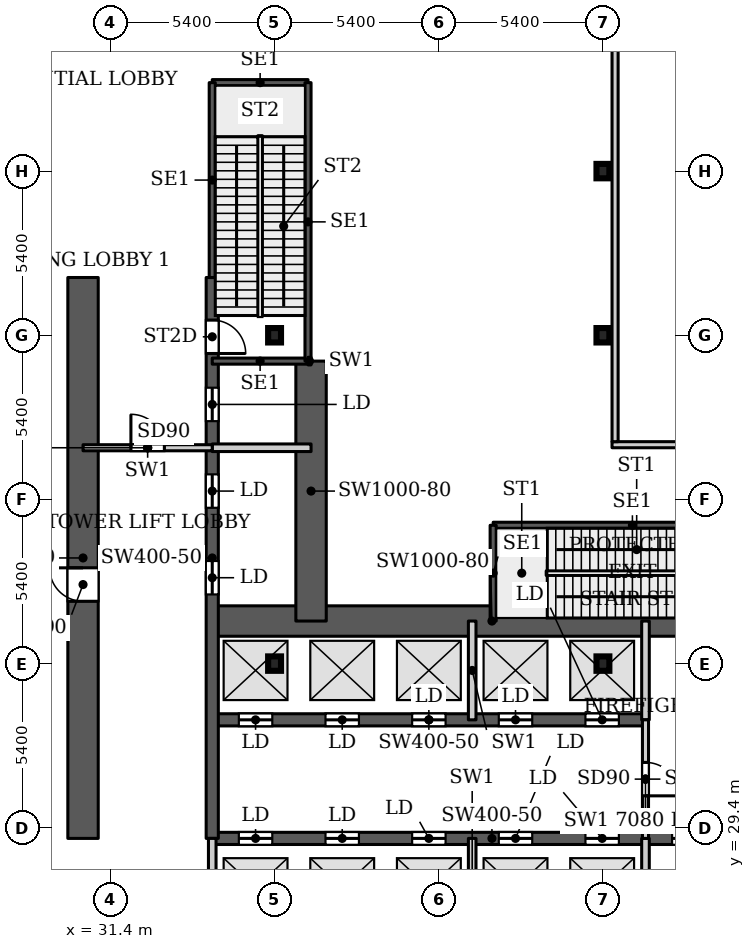
"""IFC4 building model, lengths in metres.
Left out: names, types, materials, properties, quantities, classifications, styles, units other than length and angle.
Written with IfcOpenShell. Run it as: python <this file> out.ifc"""

import sys

from ifc_helpers import new_model, si_unit, direction, frame, frame_2d, origin, origin_2d, place, context, subcontext, project, spatial, rectangle, i_section, extrude, source, transform, mapped, element, fill, save


model = new_model("IFC4")
c1 = context("Model", 3, precision=1e-05, world=origin(), true_north=direction((0.0, 1.0)))
c2 = subcontext(c1, "Body", "Model", "MODEL_VIEW")
j1 = project(units=[si_unit("LENGTHUNIT", "METRE"), si_unit("PLANEANGLEUNIT", "RADIAN")], contexts=[c1])
p1 = place(None, origin())
s1 = spatial("IfcSite", under=j1, at=p1, CompositionType="ELEMENT")
p2 = place(p1, origin())
s2 = spatial("IfcBuilding", under=s1, at=p2, CompositionType="ELEMENT")
p3 = place(p2, origin())
s3 = spatial("IfcBuildingStorey", under=s2, at=p3, CompositionType="ELEMENT", Elevation=0.0)
for number, where, z_axis, x_axis in (
    (1, (36.8, 34.8, 0.0), (0.0, 0.0, 1.0), (1.0, 0.0, 0.0)),
    (2, (47.6, 34.8, 0.0), (0.0, 0.0, 1.0), (1.0, 0.0, 0.0)),
    (3, (36.8, 45.6, 0.0), (0.0, 0.0, 1.0), (1.0, 0.0, 0.0)),
    (4, (47.6, 45.6, 0.0), (0.0, 0.0, 1.0), (1.0, 0.0, 0.0)),
    (5, (47.6, 51.0, 0.0), (0.0, 0.0, 1.0), (1.0, 0.0, 0.0)),
):
    element("IfcColumn", number, at=place(p3, frame(where, z_axis=z_axis, x_axis=x_axis)), inside=s3, PredefinedType="COLUMN", context=c2, shape_type="SweptSolid", body=[
        extrude(i_section(OverallWidth=0.424, OverallDepth=0.474, WebThickness=0.048, FlangeThickness=0.077, FilletRadius=0.014, at=origin_2d()), origin(), (0.0, 0.0, 1.0), 7.5),
    ])
p4 = place(p3, frame((34.75, 29.05, 0.0), z_axis=(0.0, 0.0, 1.0), x_axis=(1.0, 0.0, 0.0)))
e6 = element("IfcWall", 6, at=p4, inside=s3, PredefinedType="SHEAR", context=c2, shape_type="SweptSolid", body=[
    extrude(rectangle(XDim=18.4, YDim=0.4, at=frame_2d((9.2, 0.0))), origin(), (0.0, 0.0, 1.0), 7.5),
])
p5 = place(p4, frame((0.875, 0.0, 0.0)))
e7 = element("IfcOpeningElement", 7, at=p5, cuts=e6, PredefinedType="OPENING", context=c2, shape_type="SweptSolid", body=[
    extrude(rectangle(XDim=1.1, YDim=2.2, at=frame_2d((0.55, 1.1))), frame((0.0, 0.21, 0.0), z_axis=(0.0, -1.0, 0.0), x_axis=(1.0, 0.0, 0.0)), (0.0, 0.0, 1.0), 0.42),
])
p6 = place(p4, frame((3.725, 0.0, 0.0)))
e8 = element("IfcOpeningElement", 8, at=p6, cuts=e6, PredefinedType="OPENING", context=c2, shape_type="SweptSolid", body=[
    extrude(rectangle(XDim=1.1, YDim=2.2, at=frame_2d((0.55, 1.1))), frame((0.0, 0.21, 0.0), z_axis=(0.0, -1.0, 0.0), x_axis=(1.0, 0.0, 0.0)), (0.0, 0.0, 1.0), 0.42),
])
p7 = place(p4, frame((6.575, 0.0, 0.0)))
e9 = element("IfcOpeningElement", 9, at=p7, cuts=e6, PredefinedType="OPENING", context=c2, shape_type="SweptSolid", body=[
    extrude(rectangle(XDim=1.1, YDim=2.2, at=frame_2d((0.55, 1.1))), frame((0.0, 0.21, 0.0), z_axis=(0.0, -1.0, 0.0), x_axis=(1.0, 0.0, 0.0)), (0.0, 0.0, 1.0), 0.42),
])
p8 = place(p4, frame((9.425, 0.0, 0.0)))
e10 = element("IfcOpeningElement", 10, at=p8, cuts=e6, PredefinedType="OPENING", context=c2, shape_type="SweptSolid", body=[
    extrude(rectangle(XDim=1.1, YDim=2.2, at=frame_2d((0.55, 1.1))), frame((0.0, 0.21, 0.0), z_axis=(0.0, -1.0, 0.0), x_axis=(1.0, 0.0, 0.0)), (0.0, 0.0, 1.0), 0.42),
])
p9 = place(p4, frame((12.275, 0.0, 0.0)))
e11 = element("IfcOpeningElement", 11, at=p9, cuts=e6, PredefinedType="OPENING", context=c2, shape_type="SweptSolid", body=[
    extrude(rectangle(XDim=1.1, YDim=2.2, at=frame_2d((0.55, 1.1))), frame((0.0, 0.21, 0.0), z_axis=(0.0, -1.0, 0.0), x_axis=(1.0, 0.0, 0.0)), (0.0, 0.0, 1.0), 0.42),
])
p10 = place(p4, frame((15.125, 0.0, 0.0)))
e12 = element("IfcOpeningElement", 12, at=p10, cuts=e6, PredefinedType="OPENING", context=c2, shape_type="SweptSolid", body=[
    extrude(rectangle(XDim=1.1, YDim=2.2, at=frame_2d((0.55, 1.1))), frame((0.0, 0.21, 0.0), z_axis=(0.0, -1.0, 0.0), x_axis=(1.0, 0.0, 0.0)), (0.0, 0.0, 1.0), 0.42),
])
p11 = place(p3, frame((34.75, 32.95, 0.0), z_axis=(0.0, 0.0, 1.0), x_axis=(1.0, 0.0, 0.0)))
e13 = element("IfcWall", 13, at=p11, inside=s3, PredefinedType="SHEAR", context=c2, shape_type="SweptSolid", body=[
    extrude(rectangle(XDim=14.25, YDim=0.4, at=frame_2d((7.125, 0.0))), origin(), (0.0, 0.0, 1.0), 7.5),
])
p12 = place(p11, frame((0.875, 0.0, 0.0)))
e14 = element("IfcOpeningElement", 14, at=p12, cuts=e13, PredefinedType="OPENING", context=c2, shape_type="SweptSolid", body=[
    extrude(rectangle(XDim=1.1, YDim=2.2, at=frame_2d((0.55, 1.1))), frame((0.0, 0.21, 0.0), z_axis=(0.0, -1.0, 0.0), x_axis=(1.0, 0.0, 0.0)), (0.0, 0.0, 1.0), 0.42),
])
p13 = place(p11, frame((3.725, 0.0, 0.0)))
e15 = element("IfcOpeningElement", 15, at=p13, cuts=e13, PredefinedType="OPENING", context=c2, shape_type="SweptSolid", body=[
    extrude(rectangle(XDim=1.1, YDim=2.2, at=frame_2d((0.55, 1.1))), frame((0.0, 0.21, 0.0), z_axis=(0.0, -1.0, 0.0), x_axis=(1.0, 0.0, 0.0)), (0.0, 0.0, 1.0), 0.42),
])
p14 = place(p11, frame((6.575, 0.0, 0.0)))
e16 = element("IfcOpeningElement", 16, at=p14, cuts=e13, PredefinedType="OPENING", context=c2, shape_type="SweptSolid", body=[
    extrude(rectangle(XDim=1.1, YDim=2.2, at=frame_2d((0.55, 1.1))), frame((0.0, 0.21, 0.0), z_axis=(0.0, -1.0, 0.0), x_axis=(1.0, 0.0, 0.0)), (0.0, 0.0, 1.0), 0.42),
])
p15 = place(p11, frame((9.425, 0.0, 0.0)))
e17 = element("IfcOpeningElement", 17, at=p15, cuts=e13, PredefinedType="OPENING", context=c2, shape_type="SweptSolid", body=[
    extrude(rectangle(XDim=1.1, YDim=2.2, at=frame_2d((0.55, 1.1))), frame((0.0, 0.21, 0.0), z_axis=(0.0, -1.0, 0.0), x_axis=(1.0, 0.0, 0.0)), (0.0, 0.0, 1.0), 0.42),
])
p16 = place(p11, frame((12.275, 0.0, 0.0)))
e18 = element("IfcOpeningElement", 18, at=p16, cuts=e13, PredefinedType="OPENING", context=c2, shape_type="SweptSolid", body=[
    extrude(rectangle(XDim=1.1, YDim=2.2, at=frame_2d((0.55, 1.1))), frame((0.0, 0.21, 0.0), z_axis=(0.0, -1.0, 0.0), x_axis=(1.0, 0.0, 0.0)), (0.0, 0.0, 1.0), 0.42),
])
p17 = place(p3, frame((34.75, 36.2, 0.0), z_axis=(0.0, 0.0, 1.0), x_axis=(1.0, 0.0, 0.0)))
e19 = element("IfcWall", 19, at=p17, inside=s3, PredefinedType="SHEAR", context=c2, shape_type="SweptSolid", body=[
    extrude(rectangle(XDim=18.4, YDim=1.0, at=frame_2d((9.2, 0.0))), origin(), (0.0, 0.0, 1.0), 7.5),
])
p18 = place(p17, frame((16.9, 0.0, 0.0)))
e20 = element("IfcOpeningElement", 20, at=p18, cuts=e19, PredefinedType="OPENING", context=c2, shape_type="SweptSolid", body=[
    extrude(rectangle(XDim=1.0, YDim=2.2, at=frame_2d((0.5, 1.1))), frame((0.0, 0.51, 0.0), z_axis=(0.0, -1.0, 0.0), x_axis=(1.0, 0.0, 0.0)), (0.0, 0.0, 1.0), 1.02),
])
p19 = place(p3, frame((34.75, 29.05, 0.0), z_axis=(0.0, 0.0, 1.0), x_axis=(0.0, 1.0, 0.0)))
e21 = element("IfcWall", 21, at=p19, inside=s3, PredefinedType="SHEAR", context=c2, shape_type="SweptSolid", body=[
    extrude(rectangle(XDim=18.45, YDim=0.4, at=frame_2d((9.225, 0.0))), origin(), (0.0, 0.0, 1.0), 7.5),
])
p20 = place(p19, frame((8.025, 0.0, 0.0)))
e22 = element("IfcOpeningElement", 22, at=p20, cuts=e21, PredefinedType="OPENING", context=c2, shape_type="SweptSolid", body=[
    extrude(rectangle(XDim=1.1, YDim=2.2, at=frame_2d((0.55, 1.1))), frame((0.0, 0.21, 0.0), z_axis=(0.0, -1.0, 0.0), x_axis=(1.0, 0.0, 0.0)), (0.0, 0.0, 1.0), 0.42),
])
p21 = place(p19, frame((10.875, 0.0, 0.0)))
e23 = element("IfcOpeningElement", 23, at=p21, cuts=e21, PredefinedType="OPENING", context=c2, shape_type="SweptSolid", body=[
    extrude(rectangle(XDim=1.1, YDim=2.2, at=frame_2d((0.55, 1.1))), frame((0.0, 0.21, 0.0), z_axis=(0.0, -1.0, 0.0), x_axis=(1.0, 0.0, 0.0)), (0.0, 0.0, 1.0), 0.42),
])
p22 = place(p19, frame((13.725, 0.0, 0.0)))
e24 = element("IfcOpeningElement", 24, at=p22, cuts=e21, PredefinedType="OPENING", context=c2, shape_type="SweptSolid", body=[
    extrude(rectangle(XDim=1.1, YDim=2.2, at=frame_2d((0.55, 1.1))), frame((0.0, 0.21, 0.0), z_axis=(0.0, -1.0, 0.0), x_axis=(1.0, 0.0, 0.0)), (0.0, 0.0, 1.0), 0.42),
])
p23 = place(p19, frame((15.95, 0.0, 0.0)))
e25 = element("IfcOpeningElement", 25, at=p23, cuts=e21, PredefinedType="OPENING", context=c2, shape_type="SweptSolid", body=[
    extrude(rectangle(XDim=1.1, YDim=2.2, at=frame_2d((0.55, 1.1))), frame((0.0, 0.21, 0.0), z_axis=(0.0, -1.0, 0.0), x_axis=(1.0, 0.0, 0.0)), (0.0, 0.0, 1.0), 0.42),
])
p24 = place(p3, frame((38.0, 36.2, 0.0), z_axis=(0.0, 0.0, 1.0), x_axis=(0.0, 1.0, 0.0)))
e26 = element("IfcWall", 26, at=p24, inside=s3, PredefinedType="SHEAR", context=c2, shape_type="SweptSolid", body=[
    extrude(rectangle(XDim=8.55, YDim=1.0, at=frame_2d((4.275, 0.0))), origin(), (0.0, 0.0, 1.0), 7.5),
])
p25 = place(p3, frame((30.5, 29.05, 0.0), z_axis=(0.0, 0.0, 1.0), x_axis=(0.0, 1.0, 0.0)))
e27 = element("IfcWall", 27, at=p25, inside=s3, PredefinedType="SHEAR", context=c2, shape_type="SweptSolid", body=[
    extrude(rectangle(XDim=18.45, YDim=1.0, at=frame_2d((9.225, 0.0))), origin(), (0.0, 0.0, 1.0), 7.5),
])
p26 = place(p25, frame((7.8, 0.0, 0.0)))
e28 = element("IfcOpeningElement", 28, at=p26, cuts=e27, PredefinedType="OPENING", context=c2, shape_type="SweptSolid", body=[
    extrude(rectangle(XDim=1.1, YDim=2.2, at=frame_2d((0.55, 1.1))), frame((0.0, 0.51, 0.0), z_axis=(0.0, -1.0, 0.0), x_axis=(1.0, 0.0, 0.0)), (0.0, 0.0, 1.0), 1.02),
])
p27 = place(p3, frame((43.99, 39.35, 0.0), z_axis=(0.0, 0.0, 1.0), x_axis=(1.0, 0.0, 0.0)))
e29 = element("IfcWall", 29, at=p27, inside=s3, PredefinedType="SHEAR", context=c2, shape_type="SweptSolid", body=[
    extrude(rectangle(XDim=9.16, YDim=0.2, at=frame_2d((4.58, 0.0))), origin(), (0.0, 0.0, 1.0), 7.5),
])
p28 = place(p3, frame((43.99, 36.2, 0.0), z_axis=(0.0, 0.0, 1.0), x_axis=(0.0, 1.0, 0.0)))
e30 = element("IfcWall", 30, at=p28, inside=s3, PredefinedType="SHEAR", context=c2, shape_type="SweptSolid", body=[
    extrude(rectangle(XDim=3.15, YDim=0.2, at=frame_2d((1.575, 0.0))), origin(), (0.0, 0.0, 1.0), 7.5),
])
for number, where, z_axis, x_axis in (
    (31, (34.75, 44.75, 0.0), (0.0, 0.0, 1.0), (1.0, 0.0, 0.0)),
    (32, (34.75, 53.91, 0.0), (0.0, 0.0, 1.0), (1.0, 0.0, 0.0)),
):
    element("IfcWall", number, at=place(p3, frame(where, z_axis=z_axis, x_axis=x_axis)), inside=s3, PredefinedType="SHEAR", context=c2, shape_type="SweptSolid", body=[
        extrude(rectangle(XDim=3.15, YDim=0.2, at=frame_2d((1.575, 0.0))), origin(), (0.0, 0.0, 1.0), 7.5),
    ])
p29 = place(p3, frame((34.75, 47.5, 0.0), z_axis=(0.0, 0.0, 1.0), x_axis=(0.0, 1.0, 0.0)))
e33 = element("IfcWall", 33, at=p29, inside=s3, PredefinedType="SHEAR", context=c2, shape_type="SweptSolid", body=[
    extrude(rectangle(XDim=6.41, YDim=0.2, at=frame_2d((3.205, 0.0))), origin(), (0.0, 0.0, 1.0), 7.5),
])
p30 = place(p3, frame((37.9, 44.75, 0.0), z_axis=(0.0, 0.0, 1.0), x_axis=(0.0, 1.0, 0.0)))
e34 = element("IfcWall", 34, at=p30, inside=s3, PredefinedType="SHEAR", context=c2, shape_type="SweptSolid", body=[
    extrude(rectangle(XDim=9.16, YDim=0.2, at=frame_2d((4.58, 0.0))), origin(), (0.0, 0.0, 1.0), 7.5),
])
for number, where, z_axis, x_axis in (
    (35, (34.75, 25.8, 0.0), (0.0, 0.0, 1.0), (0.0, 1.0, 0.0)),
    (36, (43.3, 25.8, 0.0), (0.0, 0.0, 1.0), (0.0, 1.0, 0.0)),
    (37, (43.3, 32.95, 0.0), (0.0, 0.0, 1.0), (0.0, 1.0, 0.0)),
    (38, (49.0, 25.8, 0.0), (0.0, 0.0, 1.0), (0.0, 1.0, 0.0)),
    (39, (49.0, 32.95, 0.0), (0.0, 0.0, 1.0), (0.0, 1.0, 0.0)),
    (40, (34.75, 41.9, 0.0), (0.0, 0.0, 1.0), (1.0, 0.0, 0.0)),
):
    element("IfcWall", number, at=place(p3, frame(where, z_axis=z_axis, x_axis=x_axis)), inside=s3, PredefinedType="PARTITIONING", context=c2, shape_type="SweptSolid", body=[
        extrude(rectangle(XDim=3.25, YDim=0.25, at=frame_2d((1.625, 0.0))), origin(), (0.0, 0.0, 1.0), 7.5),
    ])
p31 = place(p3, frame((37.9, 44.75, 0.0), z_axis=(0.0, 0.0, 1.0), x_axis=(1.0, 0.0, 0.0)))
e41 = element("IfcWall", 41, at=p31, inside=s3, PredefinedType="PARTITIONING", context=c2, shape_type="SweptSolid", body=[
    extrude(rectangle(XDim=0.1, YDim=0.25, at=frame_2d((0.05, 0.0))), origin(), (0.0, 0.0, 1.0), 7.5),
])
p32 = place(p3, frame((49.0, 29.05, 0.0), z_axis=(0.0, 0.0, 1.0), x_axis=(0.0, 1.0, 0.0)))
e42 = element("IfcWall", 42, at=p32, inside=s3, PredefinedType="PARTITIONING", context=c2, shape_type="SweptSolid", body=[
    extrude(rectangle(XDim=3.9, YDim=0.2, at=frame_2d((1.95, 0.0))), origin(), (0.0, 0.0, 1.0), 7.08),
])
p33 = place(p32, frame((1.4, 0.0, 0.0)))
e43 = element("IfcOpeningElement", 43, at=p33, cuts=e42, PredefinedType="OPENING", context=c2, shape_type="SweptSolid", body=[
    extrude(rectangle(XDim=1.1, YDim=2.2, at=frame_2d((0.55, 1.1))), frame((0.0, 0.11, 0.0), z_axis=(0.0, -1.0, 0.0), x_axis=(1.0, 0.0, 0.0)), (0.0, 0.0, 1.0), 0.22),
])
p34 = place(p3, frame((30.5, 41.9, 0.0), z_axis=(0.0, 0.0, 1.0), x_axis=(1.0, 0.0, 0.0)))
e44 = element("IfcWall", 44, at=p34, inside=s3, PredefinedType="PARTITIONING", context=c2, shape_type="SweptSolid", body=[
    extrude(rectangle(XDim=4.25, YDim=0.2, at=frame_2d((2.125, 0.0))), origin(), (0.0, 0.0, 1.0), 7.08),
])
p35 = place(p34, frame((1.575, 0.0, 0.0)))
e45 = element("IfcOpeningElement", 45, at=p35, cuts=e44, PredefinedType="OPENING", context=c2, shape_type="SweptSolid", body=[
    extrude(rectangle(XDim=1.1, YDim=2.2, at=frame_2d((0.55, 1.1))), frame((0.0, 0.11, 0.0), z_axis=(0.0, -1.0, 0.0), x_axis=(1.0, 0.0, 0.0)), (0.0, 0.0, 1.0), 0.22),
])
p36 = place(p3, frame((47.9, 42.0, 0.0), z_axis=(0.0, 0.0, 1.0), x_axis=(1.0, 0.0, 0.0)))
e46 = element("IfcWall", 46, at=p36, inside=s3, PredefinedType="PARTITIONING", context=c2, shape_type="SweptSolid", body=[
    extrude(rectangle(XDim=64.1, YDim=0.2, at=frame_2d((32.05, 0.0))), origin(), (0.0, 0.0, 1.0), 7.08),
])
p37 = place(p36, frame((47.5, 0.0, 0.0)))
e47 = element("IfcOpeningElement", 47, at=p37, cuts=e46, PredefinedType="OPENING", context=c2, shape_type="SweptSolid", body=[
    extrude(rectangle(XDim=1.0, YDim=2.1, at=frame_2d((0.5, 1.05))), frame((0.0, 0.11, 0.0), z_axis=(0.0, -1.0, 0.0), x_axis=(1.0, 0.0, 0.0)), (0.0, 0.0, 1.0), 0.22),
])
p38 = place(p36, frame((55.5, 0.0, 0.0)))
e48 = element("IfcOpeningElement", 48, at=p38, cuts=e46, PredefinedType="OPENING", context=c2, shape_type="SweptSolid", body=[
    extrude(rectangle(XDim=1.0, YDim=2.1, at=frame_2d((0.5, 1.05))), frame((0.0, 0.11, 0.0), z_axis=(0.0, -1.0, 0.0), x_axis=(1.0, 0.0, 0.0)), (0.0, 0.0, 1.0), 0.22),
])
p39 = place(p3, frame((48.0, 42.1, 0.0), z_axis=(0.0, 0.0, 1.0), x_axis=(0.0, 1.0, 0.0)))
e49 = element("IfcWall", 49, at=p39, inside=s3, PredefinedType="PARTITIONING", context=c2, shape_type="SweptSolid", body=[
    extrude(rectangle(XDim=29.9, YDim=0.2, at=frame_2d((14.95, 0.0))), origin(), (0.0, 0.0, 1.0), 7.08),
])
p40 = place(p39, frame((25.8, 0.0, 0.0)))
e50 = element("IfcOpeningElement", 50, at=p40, cuts=e49, PredefinedType="OPENING", context=c2, shape_type="SweptSolid", body=[
    extrude(rectangle(XDim=2.4, YDim=2.1, at=frame_2d((1.2, 1.05))), frame((0.0, 0.11, 0.0), z_axis=(0.0, -1.0, 0.0), x_axis=(1.0, 0.0, 0.0)), (0.0, 0.0, 1.0), 0.22),
])
m1 = source(origin(), c2, "Body", "SweptSolid", [
    extrude(rectangle(XDim=1.1, YDim=2.2, at=frame_2d((0.55, 1.1))), frame((0.0, 0.025, 0.0), z_axis=(0.0, -1.0, 0.0), x_axis=(1.0, 0.0, 0.0)), (0.0, 0.0, 1.0), 0.05),
])
p41 = place(p5, origin())
e51 = element("IfcDoor", 51, at=p41, inside=s3, OperationType="SLIDING_TO_LEFT", PredefinedType="DOOR", context=c2, shape_type="MappedRepresentation", body=[
    mapped(m1, transform((0.0, 0.0, 0.0), x_axis=(1.0, 0.0, 0.0), y_axis=(0.0, 1.0, 0.0), z_axis=(0.0, 0.0, 1.0), scale=1.0)),
])
fill(e7, e51)
p42 = place(p6, origin())
e52 = element("IfcDoor", 52, at=p42, inside=s3, OperationType="SLIDING_TO_LEFT", PredefinedType="DOOR", context=c2, shape_type="MappedRepresentation", body=[
    mapped(m1, transform((0.0, 0.0, 0.0), x_axis=(1.0, 0.0, 0.0), y_axis=(0.0, 1.0, 0.0), z_axis=(0.0, 0.0, 1.0), scale=1.0)),
])
fill(e8, e52)
p43 = place(p7, origin())
e53 = element("IfcDoor", 53, at=p43, inside=s3, OperationType="SLIDING_TO_LEFT", PredefinedType="DOOR", context=c2, shape_type="MappedRepresentation", body=[
    mapped(m1, transform((0.0, 0.0, 0.0), x_axis=(1.0, 0.0, 0.0), y_axis=(0.0, 1.0, 0.0), z_axis=(0.0, 0.0, 1.0), scale=1.0)),
])
fill(e9, e53)
p44 = place(p8, origin())
e54 = element("IfcDoor", 54, at=p44, inside=s3, OperationType="SLIDING_TO_LEFT", PredefinedType="DOOR", context=c2, shape_type="MappedRepresentation", body=[
    mapped(m1, transform((0.0, 0.0, 0.0), x_axis=(1.0, 0.0, 0.0), y_axis=(0.0, 1.0, 0.0), z_axis=(0.0, 0.0, 1.0), scale=1.0)),
])
fill(e10, e54)
p45 = place(p9, origin())
e55 = element("IfcDoor", 55, at=p45, inside=s3, OperationType="SLIDING_TO_LEFT", PredefinedType="DOOR", context=c2, shape_type="MappedRepresentation", body=[
    mapped(m1, transform((0.0, 0.0, 0.0), x_axis=(1.0, 0.0, 0.0), y_axis=(0.0, 1.0, 0.0), z_axis=(0.0, 0.0, 1.0), scale=1.0)),
])
fill(e11, e55)
p46 = place(p12, origin())
e56 = element("IfcDoor", 56, at=p46, inside=s3, OperationType="SLIDING_TO_LEFT", PredefinedType="DOOR", context=c2, shape_type="MappedRepresentation", body=[
    mapped(m1, transform((0.0, 0.0, 0.0), x_axis=(1.0, 0.0, 0.0), y_axis=(0.0, 1.0, 0.0), z_axis=(0.0, 0.0, 1.0), scale=1.0)),
])
fill(e14, e56)
p47 = place(p13, origin())
e57 = element("IfcDoor", 57, at=p47, inside=s3, OperationType="SLIDING_TO_LEFT", PredefinedType="DOOR", context=c2, shape_type="MappedRepresentation", body=[
    mapped(m1, transform((0.0, 0.0, 0.0), x_axis=(1.0, 0.0, 0.0), y_axis=(0.0, 1.0, 0.0), z_axis=(0.0, 0.0, 1.0), scale=1.0)),
])
fill(e15, e57)
p48 = place(p14, origin())
e58 = element("IfcDoor", 58, at=p48, inside=s3, OperationType="SLIDING_TO_LEFT", PredefinedType="DOOR", context=c2, shape_type="MappedRepresentation", body=[
    mapped(m1, transform((0.0, 0.0, 0.0), x_axis=(1.0, 0.0, 0.0), y_axis=(0.0, 1.0, 0.0), z_axis=(0.0, 0.0, 1.0), scale=1.0)),
])
fill(e16, e58)
p49 = place(p15, origin())
e59 = element("IfcDoor", 59, at=p49, inside=s3, OperationType="SLIDING_TO_LEFT", PredefinedType="DOOR", context=c2, shape_type="MappedRepresentation", body=[
    mapped(m1, transform((0.0, 0.0, 0.0), x_axis=(1.0, 0.0, 0.0), y_axis=(0.0, 1.0, 0.0), z_axis=(0.0, 0.0, 1.0), scale=1.0)),
])
fill(e17, e59)
p50 = place(p16, origin())
e60 = element("IfcDoor", 60, at=p50, inside=s3, OperationType="SLIDING_TO_LEFT", PredefinedType="DOOR", context=c2, shape_type="MappedRepresentation", body=[
    mapped(m1, transform((0.0, 0.0, 0.0), x_axis=(1.0, 0.0, 0.0), y_axis=(0.0, 1.0, 0.0), z_axis=(0.0, 0.0, 1.0), scale=1.0)),
])
fill(e18, e60)
p51 = place(p20, origin())
e61 = element("IfcDoor", 61, at=p51, inside=s3, OperationType="SLIDING_TO_LEFT", PredefinedType="DOOR", context=c2, shape_type="MappedRepresentation", body=[
    mapped(m1, transform((0.0, 0.0, 0.0), x_axis=(1.0, 0.0, 0.0), y_axis=(0.0, 1.0, 0.0), z_axis=(0.0, 0.0, 1.0), scale=1.0)),
])
fill(e22, e61)
p52 = place(p21, origin())
e62 = element("IfcDoor", 62, at=p52, inside=s3, OperationType="SLIDING_TO_LEFT", PredefinedType="DOOR", context=c2, shape_type="MappedRepresentation", body=[
    mapped(m1, transform((0.0, 0.0, 0.0), x_axis=(1.0, 0.0, 0.0), y_axis=(0.0, 1.0, 0.0), z_axis=(0.0, 0.0, 1.0), scale=1.0)),
])
fill(e23, e62)
p53 = place(p22, origin())
e63 = element("IfcDoor", 63, at=p53, inside=s3, OperationType="SLIDING_TO_LEFT", PredefinedType="DOOR", context=c2, shape_type="MappedRepresentation", body=[
    mapped(m1, transform((0.0, 0.0, 0.0), x_axis=(1.0, 0.0, 0.0), y_axis=(0.0, 1.0, 0.0), z_axis=(0.0, 0.0, 1.0), scale=1.0)),
])
fill(e24, e63)
p54 = place(p10, origin())
e64 = element("IfcDoor", 64, at=p54, inside=s3, OperationType="SLIDING_TO_LEFT", PredefinedType="DOOR", context=c2, shape_type="MappedRepresentation", body=[
    mapped(m1, transform((0.0, 0.0, 0.0), x_axis=(1.0, 0.0, 0.0), y_axis=(0.0, 1.0, 0.0), z_axis=(0.0, 0.0, 1.0), scale=1.0)),
])
fill(e12, e64)
m2 = source(origin(), c2, "Body", "SweptSolid", [
    extrude(rectangle(XDim=1.1, YDim=2.2, at=frame_2d((0.55, 1.1))), frame((0.0, 0.025, 0.0), z_axis=(0.0, -1.0, 0.0), x_axis=(1.0, 0.0, 0.0)), (0.0, 0.0, 1.0), 0.05),
])
p55 = place(p33, origin())
e65 = element("IfcDoor", 65, at=p55, inside=s3, OperationType="SINGLE_SWING_RIGHT", PredefinedType="DOOR", context=c2, shape_type="MappedRepresentation", body=[
    mapped(m2, transform((0.0, 0.0, 0.0), x_axis=(1.0, 0.0, 0.0), y_axis=(0.0, 1.0, 0.0), z_axis=(0.0, 0.0, 1.0), scale=1.0)),
])
fill(e43, e65)
p56 = place(p35, origin())
e66 = element("IfcDoor", 66, at=p56, inside=s3, OperationType="SINGLE_SWING_LEFT", PredefinedType="DOOR", context=c2, shape_type="MappedRepresentation", body=[
    mapped(m2, transform((0.0, 0.0, 0.0), x_axis=(1.0, 0.0, 0.0), y_axis=(0.0, 1.0, 0.0), z_axis=(0.0, 0.0, 1.0), scale=1.0)),
])
fill(e45, e66)
p57 = place(p26, origin())
e67 = element("IfcDoor", 67, at=p57, inside=s3, OperationType="SINGLE_SWING_LEFT", PredefinedType="DOOR", context=c2, shape_type="MappedRepresentation", body=[
    mapped(m2, transform((0.0, 0.0, 0.0), x_axis=(1.0, 0.0, 0.0), y_axis=(0.0, 1.0, 0.0), z_axis=(0.0, 0.0, 1.0), scale=1.0)),
])
fill(e28, e67)
p58 = place(p23, origin())
e68 = element("IfcDoor", 68, at=p58, inside=s3, OperationType="SINGLE_SWING_RIGHT", PredefinedType="DOOR", context=c2, shape_type="MappedRepresentation", body=[
    mapped(m2, transform((0.0, 0.0, 0.0), x_axis=(1.0, 0.0, 0.0), y_axis=(0.0, 1.0, 0.0), z_axis=(0.0, 0.0, 1.0), scale=1.0)),
])
fill(e25, e68)
save(model, sys.argv[1])
